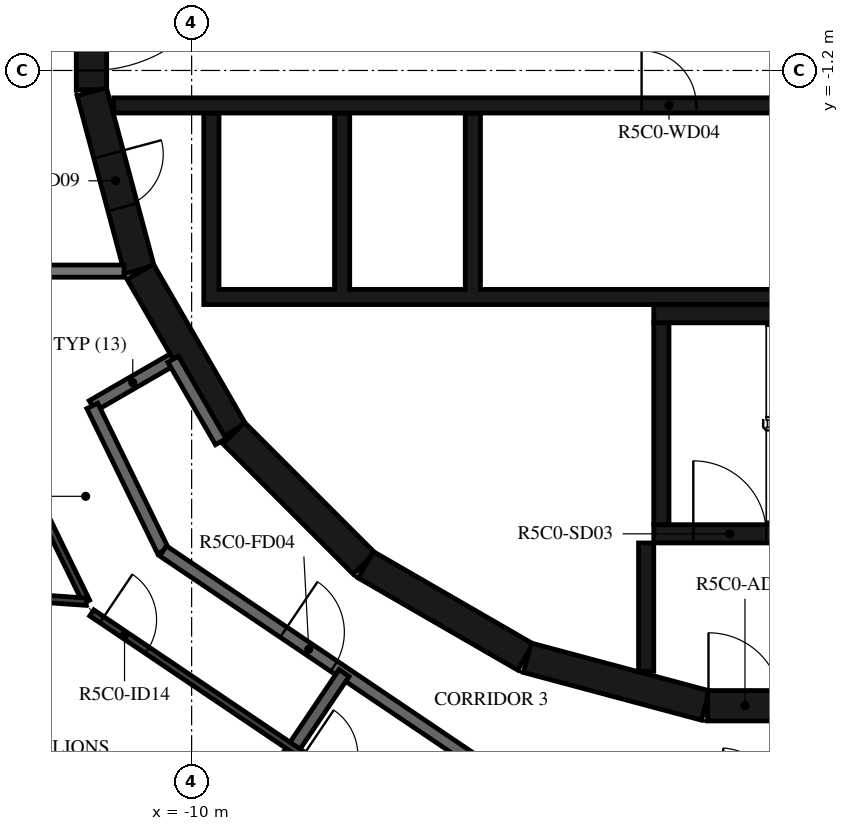
"""IFC4 building model, lengths in metres.
Left out: names, types, materials, properties, quantities, classifications, styles, units other than length and angle.
Written with IfcOpenShell. Run it as: python <this file> out.ifc"""

import sys

from ifc_helpers import new_model, si_unit, direction, frame, frame_2d, origin, place, context, subcontext, project, spatial, polyline, rectangle, outline, extrude, element, fill, save


model = new_model("IFC4")
c1 = context("Model", 3, precision=1e-05, world=origin(), true_north=direction((0.0, 1.0)))
c2 = subcontext(c1, "Body", "Model", "MODEL_VIEW")
j1 = project(units=[si_unit("LENGTHUNIT", "METRE"), si_unit("PLANEANGLEUNIT", "RADIAN")], contexts=[c1])
p1 = place(None, origin())
s1 = spatial("IfcSite", under=j1, at=p1, CompositionType="ELEMENT")
p2 = place(p1, origin())
s2 = spatial("IfcBuilding", under=s1, at=p2, CompositionType="ELEMENT")
p3 = place(p2, frame((0.0, 0.0, 216.4)))
s3 = spatial("IfcBuildingStorey", under=s2, at=p3, CompositionType="ELEMENT", Elevation=216.4)
p4 = place(p3, frame((-11.647, 1.516, 0.0), z_axis=(0.0, 0.0, 1.0), x_axis=(0.0, -1.0, 0.0)))
e1 = element("IfcWall", 1, at=p4, inside=s3, PredefinedType="SHEAR", context=c2, shape_type="SweptSolid", body=[
    extrude(rectangle(XDim=3.033, YDim=0.5, at=frame_2d((1.516, 0.0))), origin(), (0.0, 0.0, 1.0), 3.05),
])
p5 = place(p4, frame((0.316, 0.0, 0.0)))
e2 = element("IfcOpeningElement", 2, at=p5, cuts=e1, PredefinedType="OPENING", context=c2, shape_type="SweptSolid", body=[
    extrude(rectangle(XDim=2.4, YDim=2.1, at=frame_2d((1.2, 1.05))), frame((0.0, 0.26, 0.0), z_axis=(0.0, -1.0, 0.0), x_axis=(1.0, 0.0, 0.0)), (0.0, 0.0, 1.0), 0.52),
])
p6 = place(p3, frame((-11.643, -1.55, 0.0), z_axis=(0.0, 0.0, 1.0), x_axis=(0.258734743916, -0.965948410781, 0.0)))
e3 = element("IfcWall", 3, at=p6, inside=s3, PredefinedType="SHEAR", context=c2, shape_type="SweptSolid", body=[
    extrude(rectangle(XDim=3.033, YDim=0.5, at=frame_2d((1.516, 0.0))), origin(), (0.0, 0.0, 1.0), 3.05),
])
p7 = place(p6, frame((1.066, 0.0, 0.0)))
e4 = element("IfcOpeningElement", 4, at=p7, cuts=e3, PredefinedType="OPENING", context=c2, shape_type="SweptSolid", body=[
    extrude(rectangle(XDim=0.9, YDim=2.1, at=frame_2d((0.45, 1.05))), frame((0.0, 0.26, 0.0), z_axis=(0.0, -1.0, 0.0), x_axis=(1.0, 0.0, 0.0)), (0.0, 0.0, 1.0), 0.52),
])
p8 = place(p3, frame((-10.845, -4.51, 0.0), z_axis=(0.0, 0.0, 1.0), x_axis=(0.500087131594, -0.865975092491, 0.0)))
e5 = element("IfcWall", 5, at=p8, inside=s3, PredefinedType="SHEAR", context=c2, shape_type="SweptSolid", body=[
    extrude(rectangle(XDim=3.033, YDim=0.5, at=frame_2d((1.516, 0.0))), origin(), (0.0, 0.0, 1.0), 3.05),
])
p9 = place(p3, frame((-9.308, -7.164, 0.0), z_axis=(0.0, 0.0, 1.0), x_axis=(0.707106781187, -0.707106781187, 0.0)))
e6 = element("IfcWall", 6, at=p9, inside=s3, PredefinedType="SHEAR", context=c2, shape_type="SweptSolid", body=[
    extrude(rectangle(XDim=3.032, YDim=0.5, at=frame_2d((1.516, 0.0))), origin(), (0.0, 0.0, 1.0), 3.05),
])
for number, where, z_axis, x_axis in (
    (7, (-7.137, -9.329, 0.0), (0.0, 0.0, 1.0), (0.866, -0.5, 0.0)),
    (8, (-4.479, -10.858, 0.0), (0.0, 0.0, 1.0), (0.966, -0.259, 0.0)),
):
    element("IfcWall", number, at=place(p3, frame(where, z_axis=z_axis, x_axis=x_axis)), inside=s3, PredefinedType="SHEAR", context=c2, shape_type="SweptSolid", body=[
        extrude(rectangle(XDim=3.033, YDim=0.5, at=frame_2d((1.516, 0.0))), origin(), (0.0, 0.0, 1.0), 3.05),
    ])
p10 = place(p3, frame((-1.516, -11.647, 0.0), z_axis=(0.0, 0.0, 1.0), x_axis=(1.0, 0.0, 0.0)))
e9 = element("IfcWall", 9, at=p10, inside=s3, PredefinedType="SHEAR", context=c2, shape_type="SweptSolid", body=[
    extrude(rectangle(XDim=3.033, YDim=0.5, at=frame_2d((1.516, 0.0))), origin(), (0.0, 0.0, 1.0), 3.05),
])
p11 = place(p10, frame((0.016, 0.0, 0.0)))
e10 = element("IfcOpeningElement", 10, at=p11, cuts=e9, PredefinedType="OPENING", context=c2, shape_type="SweptSolid", body=[
    extrude(rectangle(XDim=1.2, YDim=2.1, at=frame_2d((0.6, 1.05))), frame((0.0, 0.26, 0.0), z_axis=(0.0, -1.0, 0.0), x_axis=(1.0, 0.0, 0.0)), (0.0, 0.0, 1.0), 0.52),
])
p12 = place(p3, frame((-2.275, -8.67, 0.0), z_axis=(0.0, 0.0, 1.0), x_axis=(0.0, 1.0, 0.0)))
e11 = element("IfcWall", 11, at=p12, inside=s3, PredefinedType="SHEAR", context=c2, shape_type="SweptSolid", body=[
    extrude(rectangle(XDim=3.32, YDim=0.25, at=frame_2d((1.66, 0.0))), origin(), (0.0, 0.0, 1.0), 3.05),
])
p13 = place(p3, frame((-2.4, -5.2, 0.0), z_axis=(0.0, 0.0, 1.0), x_axis=(1.0, 0.0, 0.0)))
e12 = element("IfcWall", 12, at=p13, inside=s3, PredefinedType="SHEAR", context=c2, shape_type="SweptSolid", body=[
    extrude(rectangle(XDim=7.05, YDim=0.3, at=frame_2d((3.525, 0.0))), origin(), (0.0, 0.0, 1.0), 3.05),
])
p14 = place(p3, frame((-2.4, -8.82, 0.0), z_axis=(0.0, 0.0, 1.0), x_axis=(1.0, 0.0, 0.0)))
e13 = element("IfcWall", 13, at=p14, inside=s3, PredefinedType="SHEAR", context=c2, shape_type="SweptSolid", body=[
    extrude(rectangle(XDim=2.5, YDim=0.3, at=frame_2d((1.25, 0.0))), origin(), (0.0, 0.0, 1.0), 3.05),
])
p15 = place(p14, frame((0.65, 0.0, 0.0)))
e14 = element("IfcOpeningElement", 14, at=p15, cuts=e13, PredefinedType="OPENING", context=c2, shape_type="SweptSolid", body=[
    extrude(rectangle(XDim=1.2, YDim=2.1, at=frame_2d((0.6, 1.05))), frame((0.0, 0.16, 0.0), z_axis=(0.0, -1.0, 0.0), x_axis=(1.0, 0.0, 0.0)), (0.0, 0.0, 1.0), 0.32),
])
p16 = place(p3, frame((-2.525, -8.97, 0.0), z_axis=(0.0, 0.0, 1.0), x_axis=(0.0, -1.0, 0.0)))
e15 = element("IfcWall", 15, at=p16, inside=s3, PredefinedType="SHEAR", context=c2, shape_type="SweptSolid", body=[
    extrude(rectangle(XDim=2.11, YDim=0.25, at=frame_2d((1.055, 0.0))), origin(), (0.0, 0.0, 1.0), 3.05),
])
p17 = place(p3, origin())
e16 = element("IfcWall", 16, at=p17, inside=s3, PredefinedType="SHEAR", context=c2, shape_type="SweptSolid", body=[
    extrude(outline(polyline([(9.8, -5.05), (9.8, -4.8), (9.8, -1.9), (9.55, -1.9), (9.55, -4.8), (7.65, -4.8), (7.65, -1.9), (7.4, -1.9), (7.4, -4.8), (5.5, -4.8), (5.5, -1.9), (5.25, -1.9), (5.25, -4.8), (3.35, -4.8), (3.35, -1.9), (3.1, -1.9), (3.1, -4.8), (1.2, -4.8), (1.2, -1.9), (0.95, -1.9), (0.95, -4.8), (-5.25, -4.8), (-5.25, -1.9), (-5.5, -1.9), (-5.5, -4.8), (-7.4, -4.8), (-7.4, -1.9), (-7.65, -1.9), (-7.65, -4.8), (-9.55, -4.8), (-9.55, -1.9), (-9.8, -1.9), (-9.8, -4.8), (-9.8, -5.05), (9.8, -5.05)])), origin(), (0.0, 0.0, 1.0), 3.05),
])
p18 = place(p3, frame((-11.28, -1.775, 0.0), z_axis=(0.0, 0.0, 1.0), x_axis=(1.0, 0.0, 0.0)))
e17 = element("IfcWall", 17, at=p18, inside=s3, PredefinedType="SHEAR", context=c2, shape_type="SweptSolid", body=[
    extrude(rectangle(XDim=14.38, YDim=0.25, at=frame_2d((7.19, 0.0))), origin(), (0.0, 0.0, 1.0), 3.05),
])
p19 = place(p18, frame((12.88, 0.0, 0.0)))
e18 = element("IfcOpeningElement", 18, at=p19, cuts=e17, PredefinedType="OPENING", context=c2, shape_type="SweptSolid", body=[
    extrude(rectangle(XDim=1.1, YDim=2.1, at=frame_2d((0.55, 1.05))), frame((0.0, 0.135, 0.0), z_axis=(0.0, -1.0, 0.0), x_axis=(1.0, 0.0, 0.0)), (0.0, 0.0, 1.0), 0.27),
])
p20 = place(p18, frame((8.68, 0.0, 0.0)))
e19 = element("IfcOpeningElement", 19, at=p20, cuts=e17, PredefinedType="OPENING", context=c2, shape_type="SweptSolid", body=[
    extrude(rectangle(XDim=0.9, YDim=2.1, at=frame_2d((0.45, 1.05))), frame((0.0, 0.135, 0.0), z_axis=(0.0, -1.0, 0.0), x_axis=(1.0, 0.0, 0.0)), (0.0, 0.0, 1.0), 0.27),
])
p21 = place(p3, frame((-10.303, -5.949, 0.0), z_axis=(0.0, 0.0, 1.0), x_axis=(-0.866042588199, -0.499970234539, 0.0)))
e20 = element("IfcWall", 20, at=p21, inside=s3, PredefinedType="STANDARD", context=c2, shape_type="SweptSolid", body=[
    extrude(rectangle(XDim=1.535, YDim=0.2, at=frame_2d((0.768, 0.0))), origin(), (0.0, 0.0, 1.0), 3.05),
])
p22 = place(p3, frame((-11.633, -6.716, 0.0), z_axis=(0.0, 0.0, 1.0), x_axis=(0.438322116278, -0.898817958422, 0.0)))
e21 = element("IfcWall", 21, at=p22, inside=s3, PredefinedType="STANDARD", context=c2, shape_type="SweptSolid", body=[
    extrude(rectangle(XDim=2.654, YDim=0.2, at=frame_2d((1.327, 0.0))), origin(), (0.0, 0.0, 1.0), 3.05),
])
p23 = place(p3, frame((-10.47, -9.101, 0.0), z_axis=(0.0, 0.0, 1.0), x_axis=(0.829035841718, -0.559195469534, 0.0)))
e22 = element("IfcWall", 22, at=p23, inside=s3, PredefinedType="STANDARD", context=c2, shape_type="SweptSolid", body=[
    extrude(rectangle(XDim=7.181, YDim=0.2, at=frame_2d((3.591, 0.0))), origin(), (0.0, 0.0, 1.0), 3.05),
])
p24 = place(p23, frame((2.39, 0.0, 0.0)))
e23 = element("IfcOpeningElement", 23, at=p24, cuts=e22, PredefinedType="OPENING", context=c2, shape_type="SweptSolid", body=[
    extrude(rectangle(XDim=1.0, YDim=2.1, at=frame_2d((0.5, 1.05))), frame((0.0, 0.11, 0.0), z_axis=(0.0, -1.0, 0.0), x_axis=(1.0, 0.0, 0.0)), (0.0, 0.0, 1.0), 0.22),
])
p25 = place(p3, frame((-9.52, -7.305, 0.0), z_axis=(0.0, 0.0, 1.0), x_axis=(-0.500028278809, 0.866009076391, 0.0)))
e24 = element("IfcWall", 24, at=p25, inside=s3, PredefinedType="STANDARD", context=c2, shape_type="SweptSolid", body=[
    extrude(rectangle(XDim=1.566, YDim=0.2, at=frame_2d((0.783, 0.0))), origin(), (0.0, 0.0, 1.0), 3.05),
])
p26 = place(p3, frame((-18.55, -4.5, 0.0), z_axis=(0.0, 0.0, 1.0), x_axis=(1.0, 0.0, 0.0)))
e25 = element("IfcWall", 25, at=p26, inside=s3, PredefinedType="STANDARD", context=c2, shape_type="SweptSolid", body=[
    extrude(rectangle(XDim=7.438, YDim=0.2, at=frame_2d((3.719, 0.0))), origin(), (0.0, 0.0, 1.0), 3.05),
])
p27 = place(p3, frame((-10.408, -15.43, 0.0), z_axis=(0.0, 0.0, 1.0), x_axis=(0.559199317758, 0.829033246027, 0.0)))
e26 = element("IfcWall", 26, at=p27, inside=s3, PredefinedType="STANDARD", context=c2, shape_type="SweptSolid", body=[
    extrude(rectangle(XDim=5.212, YDim=0.2, at=frame_2d((2.606, 0.0))), origin(), (0.0, 0.0, 1.0), 3.05),
])
p28 = place(p3, frame((-14.383, -4.5, 0.0), z_axis=(0.0, 0.0, 1.0), x_axis=(0.438393414895, -0.898783185077, 0.0)))
e27 = element("IfcWall", 27, at=p28, inside=s3, PredefinedType="PARTITIONING", context=c2, shape_type="SweptSolid", body=[
    extrude(rectangle(XDim=6.049, YDim=0.12, at=frame_2d((3.024, 0.0))), origin(), (0.0, 0.0, 1.0), 3.05),
])
p29 = place(p28, frame((0.4, 0.0, 0.0)))
e28 = element("IfcOpeningElement", 28, at=p29, cuts=e27, PredefinedType="OPENING", context=c2, shape_type="SweptSolid", body=[
    extrude(rectangle(XDim=0.8, YDim=2.1, at=frame_2d((0.4, 1.05))), frame((0.0, 0.07, 0.0), z_axis=(0.0, -1.0, 0.0), x_axis=(1.0, 0.0, 0.0)), (0.0, 0.0, 1.0), 0.14),
])
p30 = place(p3, frame((-11.642, -10.12, 0.0), z_axis=(0.0, 0.0, 1.0), x_axis=(0.829029427133, -0.559204979365, 0.0)))
e29 = element("IfcWall", 29, at=p30, inside=s3, PredefinedType="PARTITIONING", context=c2, shape_type="SweptSolid", body=[
    extrude(rectangle(XDim=6.904, YDim=0.12, at=frame_2d((3.452, 0.0))), origin(), (0.0, 0.0, 1.0), 3.05),
])
p31 = place(p30, frame((0.2, 0.0, 0.0)))
e30 = element("IfcOpeningElement", 30, at=p31, cuts=e29, PredefinedType="OPENING", context=c2, shape_type="SweptSolid", body=[
    extrude(rectangle(XDim=0.9, YDim=2.1, at=frame_2d((0.45, 1.05))), frame((0.0, 0.07, 0.0), z_axis=(0.0, -1.0, 0.0), x_axis=(1.0, 0.0, 0.0)), (0.0, 0.0, 1.0), 0.14),
])
p32 = place(p30, frame((4.192, 0.0, 0.0)))
e31 = element("IfcOpeningElement", 31, at=p32, cuts=e29, PredefinedType="OPENING", context=c2, shape_type="SweptSolid", body=[
    extrude(rectangle(XDim=0.9, YDim=2.1, at=frame_2d((0.45, 1.05))), frame((0.0, 0.07, 0.0), z_axis=(0.0, -1.0, 0.0), x_axis=(1.0, 0.0, 0.0)), (0.0, 0.0, 1.0), 0.14),
])
p33 = place(p3, frame((-15.294, -9.688, 0.0), z_axis=(0.0, 0.0, 1.0), x_axis=(0.997565819809, -0.069731163391, 0.0)))
e32 = element("IfcWall", 32, at=p33, inside=s3, PredefinedType="PARTITIONING", context=c2, shape_type="SweptSolid", body=[
    extrude(rectangle(XDim=3.571, YDim=0.12, at=frame_2d((1.786, 0.0))), origin(), (0.0, 0.0, 1.0), 3.05),
])
p34 = place(p15, origin())
e33 = element("IfcDoor", 33, at=p34, inside=s3, OperationType="SINGLE_SWING_LEFT", PredefinedType="DOOR", context=c2, shape_type="SweptSolid", body=[
    extrude(rectangle(XDim=1.2, YDim=2.1, at=frame_2d((0.6, 1.05))), frame((0.0, 0.025, 0.0), z_axis=(0.0, -1.0, 0.0), x_axis=(1.0, 0.0, 0.0)), (0.0, 0.0, 1.0), 0.05),
])
fill(e14, e33)
p35 = place(p11, origin())
e34 = element("IfcDoor", 34, at=p35, inside=s3, OperationType="SINGLE_SWING_RIGHT", PredefinedType="DOOR", context=c2, shape_type="SweptSolid", body=[
    extrude(rectangle(XDim=1.2, YDim=2.1, at=frame_2d((0.6, 1.05))), frame((0.0, 0.025, 0.0), z_axis=(0.0, -1.0, 0.0), x_axis=(1.0, 0.0, 0.0)), (0.0, 0.0, 1.0), 0.05),
])
fill(e10, e34)
p36 = place(p5, origin())
e35 = element("IfcDoor", 35, at=p36, inside=s3, OperationType="DOUBLE_DOOR_SINGLE_SWING", PredefinedType="DOOR", context=c2, shape_type="SweptSolid", body=[
    extrude(rectangle(XDim=2.4, YDim=2.1, at=frame_2d((1.2, 1.05))), frame((0.0, 0.025, 0.0), z_axis=(0.0, -1.0, 0.0), x_axis=(1.0, 0.0, 0.0)), (0.0, 0.0, 1.0), 0.05),
])
fill(e2, e35)
p37 = place(p20, origin())
e36 = element("IfcDoor", 36, at=p37, inside=s3, OperationType="SINGLE_SWING_RIGHT", PredefinedType="DOOR", context=c2, shape_type="SweptSolid", body=[
    extrude(rectangle(XDim=0.9, YDim=2.1, at=frame_2d((0.45, 1.05))), frame((0.0, 0.025, 0.0), z_axis=(0.0, -1.0, 0.0), x_axis=(1.0, 0.0, 0.0)), (0.0, 0.0, 1.0), 0.05),
])
fill(e19, e36)
p38 = place(p7, origin())
e37 = element("IfcDoor", 37, at=p38, inside=s3, OperationType="SINGLE_SWING_LEFT", PredefinedType="DOOR", context=c2, shape_type="SweptSolid", body=[
    extrude(rectangle(XDim=0.9, YDim=2.1, at=frame_2d((0.45, 1.05))), frame((0.0, 0.025, 0.0), z_axis=(0.0, -1.0, 0.0), x_axis=(1.0, 0.0, 0.0)), (0.0, 0.0, 1.0), 0.05),
])
fill(e4, e37)
p39 = place(p24, origin())
e38 = element("IfcDoor", 38, at=p39, inside=s3, OperationType="SINGLE_SWING_RIGHT", PredefinedType="DOOR", context=c2, shape_type="SweptSolid", body=[
    extrude(rectangle(XDim=1.0, YDim=2.1, at=frame_2d((0.5, 1.05))), frame((0.0, 0.025, 0.0), z_axis=(0.0, -1.0, 0.0), x_axis=(1.0, 0.0, 0.0)), (0.0, 0.0, 1.0), 0.05),
])
fill(e23, e38)
p40 = place(p31, origin())
e39 = element("IfcDoor", 39, at=p40, inside=s3, OperationType="SINGLE_SWING_RIGHT", PredefinedType="DOOR", context=c2, shape_type="SweptSolid", body=[
    extrude(rectangle(XDim=0.9, YDim=2.1, at=frame_2d((0.45, 1.05))), frame((0.0, 0.025, 0.0), z_axis=(0.0, -1.0, 0.0), x_axis=(1.0, 0.0, 0.0)), (0.0, 0.0, 1.0), 0.05),
])
fill(e30, e39)
save(model, sys.argv[1])
